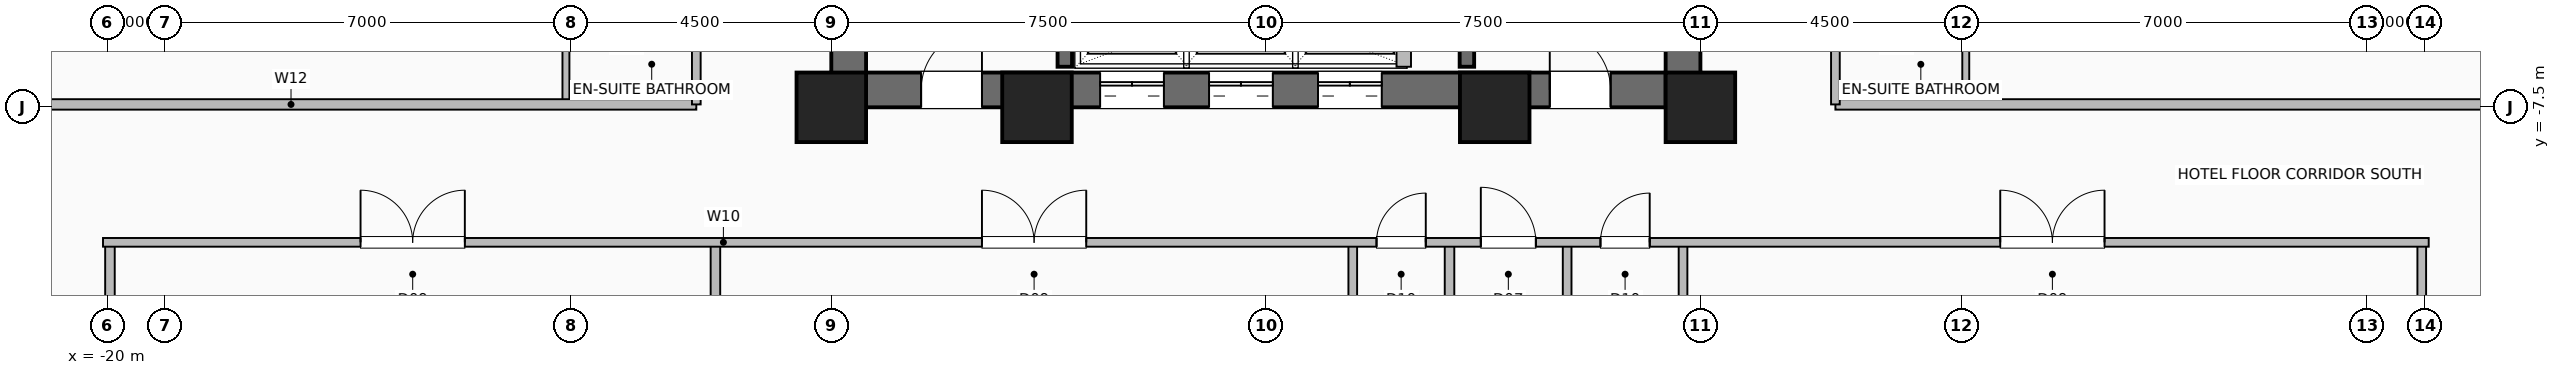
"""IFC4 building model, lengths in metres.
Left out: names, types, materials, properties, quantities, classifications, styles, units other than length and angle.
Written with IfcOpenShell. Run it as: python <this file> out.ifc"""

import sys

from ifc_helpers import new_model, si_unit, direction, frame, frame_2d, origin, origin_2d, place, context, subcontext, project, spatial, rectangle, hollow_rectangle, extrude, element, fill, save


model = new_model("IFC4")
c1 = context("Model", 3, precision=1e-05, world=origin(), true_north=direction((0.0, 1.0)))
c2 = subcontext(c1, "Body", "Model", "MODEL_VIEW")
j1 = project(units=[si_unit("LENGTHUNIT", "METRE"), si_unit("PLANEANGLEUNIT", "RADIAN")], contexts=[c1])
p1 = place(None, origin())
s1 = spatial("IfcSite", under=j1, at=p1, CompositionType="ELEMENT")
p2 = place(p1, origin())
s2 = spatial("IfcBuilding", under=s1, at=p2, CompositionType="ELEMENT")
p3 = place(p2, frame((0.0, 0.0, 55.0)))
s3 = spatial("IfcBuildingStorey", under=s2, at=p3, CompositionType="ELEMENT", Elevation=55.0)
for number, where, z_axis, x_axis in (
    (1, (-7.5, -7.5, 0.0), (0.0, 0.0, 1.0), (1.0, 0.0, 0.0)),
    (2, (-3.95, -7.5, 0.0), (0.0, 0.0, 1.0), (1.0, 0.0, 0.0)),
    (3, (3.95, -7.5, 0.0), (0.0, 0.0, 1.0), (1.0, 0.0, 0.0)),
    (4, (7.5, -7.5, 0.0), (0.0, 0.0, 1.0), (1.0, 0.0, 0.0)),
):
    element("IfcColumn", number, at=place(p3, frame(where, z_axis=z_axis, x_axis=x_axis)), inside=s3, PredefinedType="COLUMN", context=c2, shape_type="SweptSolid", body=[
        extrude(hollow_rectangle(XDim=1.2, YDim=1.2, WallThickness=0.055, at=origin_2d()), origin(), (0.0, 0.0, 1.0), 3.5),
    ])
p4 = place(p3, frame((-7.5, -7.2, 0.0), z_axis=(0.0, 0.0, 1.0), x_axis=(1.0, 0.0, 0.0)))
e5 = element("IfcWall", 5, at=p4, inside=s3, PredefinedType="SHEAR", context=c2, shape_type="SweptSolid", body=[
    extrude(rectangle(XDim=15.0, YDim=0.6, at=frame_2d((7.5, 0.0))), origin(), (0.0, 0.0, 1.0), 3.25),
])
p5 = place(p4, frame((1.55, 0.0, 0.0)))
e6 = element("IfcOpeningElement", 6, at=p5, cuts=e5, PredefinedType="OPENING", context=c2, shape_type="SweptSolid", body=[
    extrude(rectangle(XDim=1.05, YDim=2.08, at=frame_2d((0.525, 1.04))), frame((0.0, 0.31, 0.0), z_axis=(0.0, -1.0, 0.0), x_axis=(1.0, 0.0, 0.0)), (0.0, 0.0, 1.0), 0.62),
])
p6 = place(p4, frame((12.4, 0.0, 0.0)))
e7 = element("IfcOpeningElement", 7, at=p6, cuts=e5, PredefinedType="OPENING", context=c2, shape_type="SweptSolid", body=[
    extrude(rectangle(XDim=1.05, YDim=2.08, at=frame_2d((0.525, 1.04))), frame((0.0, 0.31, 0.0), z_axis=(0.0, -1.0, 0.0), x_axis=(1.0, 0.0, 0.0)), (0.0, 0.0, 1.0), 0.62),
])
p7 = place(p4, frame((4.64, 0.0, 0.0)))
e8 = element("IfcOpeningElement", 8, at=p7, cuts=e5, PredefinedType="OPENING", context=c2, shape_type="SweptSolid", body=[
    extrude(rectangle(XDim=1.1, YDim=2.2, at=frame_2d((0.55, 1.1))), frame((0.0, 0.31, 0.0), z_axis=(0.0, -1.0, 0.0), x_axis=(1.0, 0.0, 0.0)), (0.0, 0.0, 1.0), 0.62),
])
p8 = place(p4, frame((6.52, 0.0, 0.0)))
e9 = element("IfcOpeningElement", 9, at=p8, cuts=e5, PredefinedType="OPENING", context=c2, shape_type="SweptSolid", body=[
    extrude(rectangle(XDim=1.1, YDim=2.2, at=frame_2d((0.55, 1.1))), frame((0.0, 0.31, 0.0), z_axis=(0.0, -1.0, 0.0), x_axis=(1.0, 0.0, 0.0)), (0.0, 0.0, 1.0), 0.62),
])
p9 = place(p4, frame((8.4, 0.0, 0.0)))
e10 = element("IfcOpeningElement", 10, at=p9, cuts=e5, PredefinedType="OPENING", context=c2, shape_type="SweptSolid", body=[
    extrude(rectangle(XDim=1.1, YDim=2.2, at=frame_2d((0.55, 1.1))), frame((0.0, 0.31, 0.0), z_axis=(0.0, -1.0, 0.0), x_axis=(1.0, 0.0, 0.0)), (0.0, 0.0, 1.0), 0.62),
])
p10 = place(p3, frame((-7.2, -7.5, 0.0), z_axis=(0.0, 0.0, 1.0), x_axis=(0.0, 1.0, 0.0)))
e11 = element("IfcWall", 11, at=p10, inside=s3, PredefinedType="SHEAR", context=c2, shape_type="SweptSolid", body=[
    extrude(rectangle(XDim=15.0, YDim=0.6, at=frame_2d((7.5, 0.0))), origin(), (0.0, 0.0, 1.0), 3.25),
])
p11 = place(p10, frame((9.5, 0.0, 0.0)))
e12 = element("IfcOpeningElement", 12, at=p11, cuts=e11, PredefinedType="OPENING", context=c2, shape_type="SweptSolid", body=[
    extrude(rectangle(XDim=1.0, YDim=2.08, at=frame_2d((0.5, 1.04))), frame((0.0, 0.31, 0.0), z_axis=(0.0, -1.0, 0.0), x_axis=(1.0, 0.0, 0.0)), (0.0, 0.0, 1.0), 0.62),
])
p12 = place(p3, frame((7.2, -7.5, 0.0), z_axis=(0.0, 0.0, 1.0), x_axis=(0.0, 1.0, 0.0)))
e13 = element("IfcWall", 13, at=p12, inside=s3, PredefinedType="SHEAR", context=c2, shape_type="SweptSolid", body=[
    extrude(rectangle(XDim=15.0, YDim=0.6, at=frame_2d((7.5, 0.0))), origin(), (0.0, 0.0, 1.0), 3.25),
])
for number, where, z_axis, x_axis in (
    (14, (-3.47, -6.8, 0.0), (0.0, 0.0, 1.0), (0.0, 1.0, 0.0)),
    (15, (3.47, -6.8, 0.0), (0.0, 0.0, 1.0), (0.0, 1.0, 0.0)),
):
    element("IfcWall", number, at=place(p3, frame(where, z_axis=z_axis, x_axis=x_axis)), inside=s3, PredefinedType="SHEAR", context=c2, shape_type="SweptSolid", body=[
        extrude(rectangle(XDim=7.72, YDim=0.25, at=frame_2d((3.86, 0.0))), origin(), (0.0, 0.0, 1.0), 3.25),
    ])
p13 = place(p3, frame((2.38, -6.8, 0.0), z_axis=(0.0, 0.0, 1.0), x_axis=(0.0, 1.0, 0.0)))
e16 = element("IfcWall", 16, at=p13, inside=s3, PredefinedType="SHEAR", context=c2, shape_type="SweptSolid", body=[
    extrude(rectangle(XDim=2.22, YDim=0.25, at=frame_2d((1.11, 0.0))), origin(), (0.0, 0.0, 1.0), 3.25),
])
for number, where, z_axis, x_axis in (
    (17, (3.17, -23.82, 0.0), (0.0, 0.0, 1.0), (0.0, 1.0, 0.0)),
    (18, (-19.95, -23.82, 0.0), (0.0, 0.0, 1.0), (0.0, 1.0, 0.0)),
    (19, (-9.5, -23.82, 0.0), (0.0, 0.0, 1.0), (0.0, 1.0, 0.0)),
):
    element("IfcWall", number, at=place(p3, frame(where, z_axis=z_axis, x_axis=x_axis)), inside=s3, PredefinedType="PLUMBINGWALL", context=c2, shape_type="SweptSolid", body=[
        extrude(rectangle(XDim=13.99, YDim=0.165, at=frame_2d((6.995, 0.0))), origin(), (0.0, 0.0, 1.0), 3.25),
    ])
for number, where, z_axis, x_axis in (
    (20, (1.5, -23.82, 0.0), (0.0, 0.0, 1.0), (0.0, 1.0, 0.0)),
    (21, (5.2, -23.82, 0.0), (0.0, 0.0, 1.0), (0.0, 1.0, 0.0)),
    (22, (7.2, -23.82, 0.0), (0.0, 0.0, 1.0), (0.0, 1.0, 0.0)),
    (23, (19.95, -23.82, 0.0), (0.0, 0.0, 1.0), (0.0, 1.0, 0.0)),
):
    element("IfcWall", number, at=place(p3, frame(where, z_axis=z_axis, x_axis=x_axis)), inside=s3, PredefinedType="PARTITIONING", context=c2, shape_type="SweptSolid", body=[
        extrude(rectangle(XDim=13.99, YDim=0.15, at=frame_2d((6.995, 0.0))), origin(), (0.0, 0.0, 1.0), 3.25),
    ])
p14 = place(p3, frame((-20.07, -9.83, 0.0), z_axis=(0.0, 0.0, 1.0), x_axis=(1.0, 0.0, 0.0)))
e24 = element("IfcWall", 24, at=p14, inside=s3, PredefinedType="PARTITIONING", context=c2, shape_type="SweptSolid", body=[
    extrude(rectangle(XDim=40.14, YDim=0.15, at=frame_2d((20.07, 0.0))), origin(), (0.0, 0.0, 1.0), 3.25),
])
p15 = place(p14, frame((4.445, 0.0, 0.0)))
e25 = element("IfcOpeningElement", 25, at=p15, cuts=e24, PredefinedType="OPENING", context=c2, shape_type="SweptSolid", body=[
    extrude(rectangle(XDim=1.8, YDim=2.08, at=frame_2d((0.9, 1.04))), frame((0.0, 0.085, 0.0), z_axis=(0.0, -1.0, 0.0), x_axis=(1.0, 0.0, 0.0)), (0.0, 0.0, 1.0), 0.17),
])
p16 = place(p14, frame((15.17, 0.0, 0.0)))
e26 = element("IfcOpeningElement", 26, at=p16, cuts=e24, PredefinedType="OPENING", context=c2, shape_type="SweptSolid", body=[
    extrude(rectangle(XDim=1.8, YDim=2.08, at=frame_2d((0.9, 1.04))), frame((0.0, 0.085, 0.0), z_axis=(0.0, -1.0, 0.0), x_axis=(1.0, 0.0, 0.0)), (0.0, 0.0, 1.0), 0.17),
])
p17 = place(p14, frame((21.98, 0.0, 0.0)))
e27 = element("IfcOpeningElement", 27, at=p17, cuts=e24, PredefinedType="OPENING", context=c2, shape_type="SweptSolid", body=[
    extrude(rectangle(XDim=0.85, YDim=2.05, at=frame_2d((0.425, 1.025))), frame((0.0, 0.085, 0.0), z_axis=(0.0, -1.0, 0.0), x_axis=(1.0, 0.0, 0.0)), (0.0, 0.0, 1.0), 0.17),
])
p18 = place(p14, frame((23.78, 0.0, 0.0)))
e28 = element("IfcOpeningElement", 28, at=p18, cuts=e24, PredefinedType="OPENING", context=c2, shape_type="SweptSolid", body=[
    extrude(rectangle(XDim=0.95, YDim=2.06, at=frame_2d((0.475, 1.03))), frame((0.0, 0.085, 0.0), z_axis=(0.0, -1.0, 0.0), x_axis=(1.0, 0.0, 0.0)), (0.0, 0.0, 1.0), 0.17),
])
p19 = place(p14, frame((25.845, 0.0, 0.0)))
e29 = element("IfcOpeningElement", 29, at=p19, cuts=e24, PredefinedType="OPENING", context=c2, shape_type="SweptSolid", body=[
    extrude(rectangle(XDim=0.85, YDim=2.05, at=frame_2d((0.425, 1.025))), frame((0.0, 0.085, 0.0), z_axis=(0.0, -1.0, 0.0), x_axis=(1.0, 0.0, 0.0)), (0.0, 0.0, 1.0), 0.17),
])
p20 = place(p14, frame((32.745, 0.0, 0.0)))
e30 = element("IfcOpeningElement", 30, at=p20, cuts=e24, PredefinedType="OPENING", context=c2, shape_type="SweptSolid", body=[
    extrude(rectangle(XDim=1.8, YDim=2.08, at=frame_2d((0.9, 1.04))), frame((0.0, 0.085, 0.0), z_axis=(0.0, -1.0, 0.0), x_axis=(1.0, 0.0, 0.0)), (0.0, 0.0, 1.0), 0.17),
])
p21 = place(p3, frame((-12.08, -7.42, 0.0), z_axis=(0.0, 0.0, 1.0), x_axis=(0.0, 1.0, 0.0)))
e31 = element("IfcWall", 31, at=p21, inside=s3, PredefinedType="PLUMBINGWALL", context=c2, shape_type="SweptSolid", body=[
    extrude(rectangle(XDim=2.008, YDim=0.12, at=frame_2d((1.004, 0.0))), origin(), (0.0, 0.0, 1.0), 3.25),
])
p22 = place(p3, frame((-23.82, -7.45, 0.0), z_axis=(0.0, 0.0, 1.0), x_axis=(1.0, 0.0, 0.0)))
e32 = element("IfcWall", 32, at=p22, inside=s3, PredefinedType="PARTITIONING", context=c2, shape_type="SweptSolid", body=[
    extrude(rectangle(XDim=13.99, YDim=0.18, at=frame_2d((6.995, 0.0))), origin(), (0.0, 0.0, 1.0), 3.25),
])
p23 = place(p3, frame((-9.83, -7.45, 0.0), z_axis=(0.0, 0.0, 1.0), x_axis=(0.0, 1.0, 0.0)))
e33 = element("IfcWall", 33, at=p23, inside=s3, PredefinedType="PARTITIONING", context=c2, shape_type="SweptSolid", body=[
    extrude(rectangle(XDim=14.9, YDim=0.15, at=frame_2d((7.45, 0.0))), origin(), (0.0, 0.0, 1.0), 3.25),
])
p24 = place(p23, frame((3.049, 0.0, 0.0)))
e34 = element("IfcOpeningElement", 34, at=p24, cuts=e33, PredefinedType="OPENING", context=c2, shape_type="SweptSolid", body=[
    extrude(rectangle(XDim=0.95, YDim=2.08, at=frame_2d((0.475, 1.04))), frame((0.0, 0.085, 0.0), z_axis=(0.0, -1.0, 0.0), x_axis=(1.0, 0.0, 0.0)), (0.0, 0.0, 1.0), 0.17),
])
p25 = place(p23, frame((7.927, 0.0, 0.0)))
e35 = element("IfcOpeningElement", 35, at=p25, cuts=e33, PredefinedType="OPENING", context=c2, shape_type="SweptSolid", body=[
    extrude(rectangle(XDim=0.95, YDim=2.08, at=frame_2d((0.475, 1.04))), frame((0.0, 0.085, 0.0), z_axis=(0.0, -1.0, 0.0), x_axis=(1.0, 0.0, 0.0)), (0.0, 0.0, 1.0), 0.17),
])
p26 = place(p23, frame((12.899, 0.0, 0.0)))
e36 = element("IfcOpeningElement", 36, at=p26, cuts=e33, PredefinedType="OPENING", context=c2, shape_type="SweptSolid", body=[
    extrude(rectangle(XDim=0.95, YDim=2.08, at=frame_2d((0.475, 1.04))), frame((0.0, 0.085, 0.0), z_axis=(0.0, -1.0, 0.0), x_axis=(1.0, 0.0, 0.0)), (0.0, 0.0, 1.0), 0.17),
])
p27 = place(p3, frame((12.08, -7.42, 0.0), z_axis=(0.0, 0.0, 1.0), x_axis=(0.0, 1.0, 0.0)))
e37 = element("IfcWall", 37, at=p27, inside=s3, PredefinedType="PLUMBINGWALL", context=c2, shape_type="SweptSolid", body=[
    extrude(rectangle(XDim=2.008, YDim=0.12, at=frame_2d((1.004, 0.0))), origin(), (0.0, 0.0, 1.0), 3.25),
])
p28 = place(p3, frame((9.83, -7.45, 0.0), z_axis=(0.0, 0.0, 1.0), x_axis=(1.0, 0.0, 0.0)))
e38 = element("IfcWall", 38, at=p28, inside=s3, PredefinedType="PARTITIONING", context=c2, shape_type="SweptSolid", body=[
    extrude(rectangle(XDim=13.99, YDim=0.18, at=frame_2d((6.995, 0.0))), origin(), (0.0, 0.0, 1.0), 3.25),
])
p29 = place(p3, frame((9.83, -7.45, 0.0), z_axis=(0.0, 0.0, 1.0), x_axis=(0.0, 1.0, 0.0)))
e39 = element("IfcWall", 39, at=p29, inside=s3, PredefinedType="PARTITIONING", context=c2, shape_type="SweptSolid", body=[
    extrude(rectangle(XDim=14.9, YDim=0.15, at=frame_2d((7.45, 0.0))), origin(), (0.0, 0.0, 1.0), 3.25),
])
p30 = place(p29, frame((3.049, 0.0, 0.0)))
e40 = element("IfcOpeningElement", 40, at=p30, cuts=e39, PredefinedType="OPENING", context=c2, shape_type="SweptSolid", body=[
    extrude(rectangle(XDim=0.95, YDim=2.08, at=frame_2d((0.475, 1.04))), frame((0.0, 0.085, 0.0), z_axis=(0.0, -1.0, 0.0), x_axis=(1.0, 0.0, 0.0)), (0.0, 0.0, 1.0), 0.17),
])
p31 = place(p29, frame((7.927, 0.0, 0.0)))
e41 = element("IfcOpeningElement", 41, at=p31, cuts=e39, PredefinedType="OPENING", context=c2, shape_type="SweptSolid", body=[
    extrude(rectangle(XDim=0.95, YDim=2.08, at=frame_2d((0.475, 1.04))), frame((0.0, 0.085, 0.0), z_axis=(0.0, -1.0, 0.0), x_axis=(1.0, 0.0, 0.0)), (0.0, 0.0, 1.0), 0.17),
])
p32 = place(p29, frame((12.899, 0.0, 0.0)))
e42 = element("IfcOpeningElement", 42, at=p32, cuts=e39, PredefinedType="OPENING", context=c2, shape_type="SweptSolid", body=[
    extrude(rectangle(XDim=0.95, YDim=2.08, at=frame_2d((0.475, 1.04))), frame((0.0, 0.085, 0.0), z_axis=(0.0, -1.0, 0.0), x_axis=(1.0, 0.0, 0.0)), (0.0, 0.0, 1.0), 0.17),
])
p33 = place(p5, origin())
e43 = element("IfcDoor", 43, at=p33, inside=s3, OperationType="SINGLE_SWING_RIGHT", PredefinedType="DOOR", context=c2, shape_type="SweptSolid", body=[
    extrude(rectangle(XDim=1.05, YDim=2.08, at=frame_2d((0.525, 1.04))), frame((0.0, 0.025, 0.0), z_axis=(0.0, -1.0, 0.0), x_axis=(1.0, 0.0, 0.0)), (0.0, 0.0, 1.0), 0.05),
])
fill(e6, e43)
p34 = place(p6, origin())
e44 = element("IfcDoor", 44, at=p34, inside=s3, OperationType="SINGLE_SWING_LEFT", PredefinedType="DOOR", context=c2, shape_type="SweptSolid", body=[
    extrude(rectangle(XDim=1.05, YDim=2.08, at=frame_2d((0.525, 1.04))), frame((0.0, 0.025, 0.0), z_axis=(0.0, -1.0, 0.0), x_axis=(1.0, 0.0, 0.0)), (0.0, 0.0, 1.0), 0.05),
])
fill(e7, e44)
p35 = place(p7, origin())
e45 = element("IfcDoor", 45, at=p35, inside=s3, OperationType="DOUBLE_DOOR_SLIDING", PredefinedType="DOOR", context=c2, shape_type="SweptSolid", body=[
    extrude(rectangle(XDim=1.1, YDim=2.2, at=frame_2d((0.55, 1.1))), frame((0.0, 0.025, 0.0), z_axis=(0.0, -1.0, 0.0), x_axis=(1.0, 0.0, 0.0)), (0.0, 0.0, 1.0), 0.05),
])
fill(e8, e45)
p36 = place(p8, origin())
e46 = element("IfcDoor", 46, at=p36, inside=s3, OperationType="DOUBLE_DOOR_SLIDING", PredefinedType="DOOR", context=c2, shape_type="SweptSolid", body=[
    extrude(rectangle(XDim=1.1, YDim=2.2, at=frame_2d((0.55, 1.1))), frame((0.0, 0.025, 0.0), z_axis=(0.0, -1.0, 0.0), x_axis=(1.0, 0.0, 0.0)), (0.0, 0.0, 1.0), 0.05),
])
fill(e9, e46)
p37 = place(p9, origin())
e47 = element("IfcDoor", 47, at=p37, inside=s3, OperationType="DOUBLE_DOOR_SLIDING", PredefinedType="DOOR", context=c2, shape_type="SweptSolid", body=[
    extrude(rectangle(XDim=1.1, YDim=2.2, at=frame_2d((0.55, 1.1))), frame((0.0, 0.025, 0.0), z_axis=(0.0, -1.0, 0.0), x_axis=(1.0, 0.0, 0.0)), (0.0, 0.0, 1.0), 0.05),
])
fill(e10, e47)
p38 = place(p15, origin())
e48 = element("IfcDoor", 48, at=p38, inside=s3, OperationType="DOUBLE_DOOR_SINGLE_SWING", PredefinedType="DOOR", context=c2, shape_type="SweptSolid", body=[
    extrude(rectangle(XDim=1.8, YDim=2.08, at=frame_2d((0.9, 1.04))), frame((0.0, 0.025, 0.0), z_axis=(0.0, -1.0, 0.0), x_axis=(1.0, 0.0, 0.0)), (0.0, 0.0, 1.0), 0.05),
])
fill(e25, e48)
p39 = place(p16, origin())
e49 = element("IfcDoor", 49, at=p39, inside=s3, OperationType="DOUBLE_DOOR_SINGLE_SWING", PredefinedType="DOOR", context=c2, shape_type="SweptSolid", body=[
    extrude(rectangle(XDim=1.8, YDim=2.08, at=frame_2d((0.9, 1.04))), frame((0.0, 0.025, 0.0), z_axis=(0.0, -1.0, 0.0), x_axis=(1.0, 0.0, 0.0)), (0.0, 0.0, 1.0), 0.05),
])
fill(e26, e49)
p40 = place(p17, origin())
e50 = element("IfcDoor", 50, at=p40, inside=s3, OperationType="SINGLE_SWING_RIGHT", PredefinedType="DOOR", context=c2, shape_type="SweptSolid", body=[
    extrude(rectangle(XDim=0.85, YDim=2.05, at=frame_2d((0.425, 1.025))), frame((0.0, 0.025, 0.0), z_axis=(0.0, -1.0, 0.0), x_axis=(1.0, 0.0, 0.0)), (0.0, 0.0, 1.0), 0.05),
])
fill(e27, e50)
p41 = place(p18, origin())
e51 = element("IfcDoor", 51, at=p41, inside=s3, OperationType="SINGLE_SWING_LEFT", PredefinedType="DOOR", context=c2, shape_type="SweptSolid", body=[
    extrude(rectangle(XDim=0.95, YDim=2.06, at=frame_2d((0.475, 1.03))), frame((0.0, 0.025, 0.0), z_axis=(0.0, -1.0, 0.0), x_axis=(1.0, 0.0, 0.0)), (0.0, 0.0, 1.0), 0.05),
])
fill(e28, e51)
p42 = place(p19, origin())
e52 = element("IfcDoor", 52, at=p42, inside=s3, OperationType="SINGLE_SWING_RIGHT", PredefinedType="DOOR", context=c2, shape_type="SweptSolid", body=[
    extrude(rectangle(XDim=0.85, YDim=2.05, at=frame_2d((0.425, 1.025))), frame((0.0, 0.025, 0.0), z_axis=(0.0, -1.0, 0.0), x_axis=(1.0, 0.0, 0.0)), (0.0, 0.0, 1.0), 0.05),
])
fill(e29, e52)
p43 = place(p20, origin())
e53 = element("IfcDoor", 53, at=p43, inside=s3, OperationType="DOUBLE_DOOR_SINGLE_SWING", PredefinedType="DOOR", context=c2, shape_type="SweptSolid", body=[
    extrude(rectangle(XDim=1.8, YDim=2.08, at=frame_2d((0.9, 1.04))), frame((0.0, 0.025, 0.0), z_axis=(0.0, -1.0, 0.0), x_axis=(1.0, 0.0, 0.0)), (0.0, 0.0, 1.0), 0.05),
])
fill(e30, e53)
save(model, sys.argv[1])
